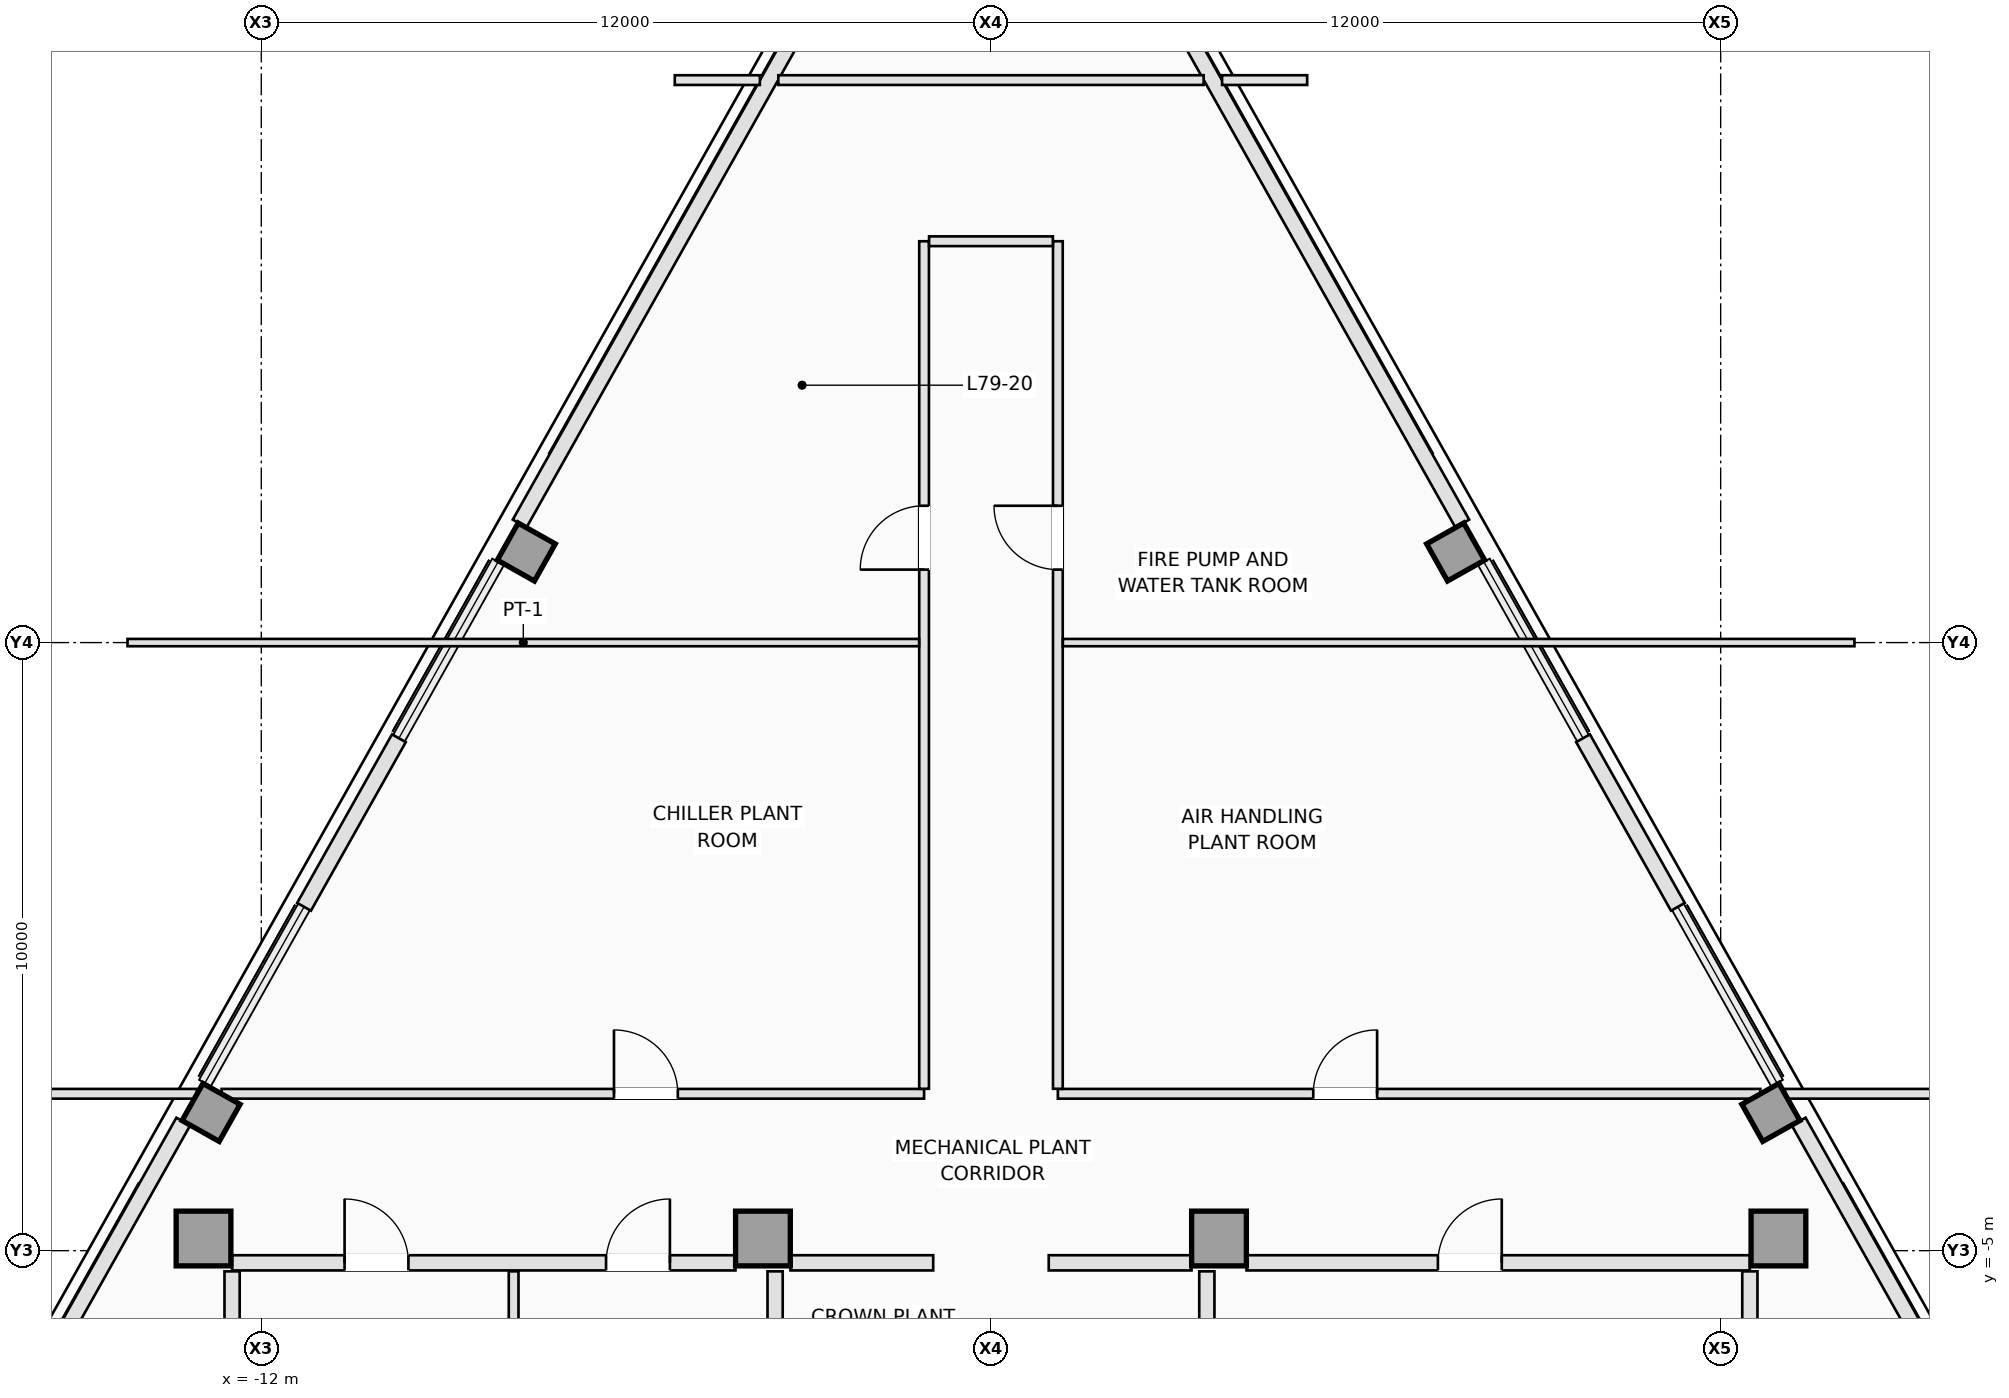
"""IFC4 building model, lengths in metres.
Left out: names, types, materials, properties, quantities, classifications, styles, units other than length and angle.
Written with IfcOpenShell. Run it as: python <this file> out.ifc"""

import sys

from ifc_helpers import new_model, si_unit, direction, frame, frame_2d, origin, origin_2d, place, context, subcontext, project, spatial, rectangle, extrude, element, fill, save


model = new_model("IFC4")
c1 = context("Model", 3, precision=1e-05, world=origin(), true_north=direction((0.0, 1.0)))
c2 = subcontext(c1, "Body", "Model", "MODEL_VIEW")
j1 = project(units=[si_unit("LENGTHUNIT", "METRE"), si_unit("PLANEANGLEUNIT", "RADIAN")], contexts=[c1])
p1 = place(None, origin())
s1 = spatial("IfcSite", under=j1, at=p1, CompositionType="ELEMENT")
p2 = place(p1, origin())
s2 = spatial("IfcBuilding", under=s1, at=p2, CompositionType="ELEMENT")
p3 = place(p2, frame((0.0, 0.0, 283.7)))
s3 = spatial("IfcBuildingStorey", under=s2, at=p3, CompositionType="ELEMENT", Elevation=283.7)
for number, where, z_axis, x_axis in (
    (1, (-12.95, -4.8, 0.0), (0.0, 0.0, 1.0), (1.0, 0.0, 0.0)),
    (2, (-3.75, -4.8, 0.0), (0.0, 0.0, 1.0), (1.0, 0.0, 0.0)),
    (3, (3.75, -4.8, 0.0), (0.0, 0.0, 1.0), (1.0, 0.0, 0.0)),
    (4, (12.95, -4.8, 0.0), (0.0, 0.0, 1.0), (1.0, 0.0, 0.0)),
):
    element("IfcColumn", number, at=place(p3, frame(where, z_axis=z_axis, x_axis=x_axis)), inside=s3, PredefinedType="COLUMN", context=c2, shape_type="SweptSolid", body=[
        extrude(rectangle(XDim=0.9, YDim=0.9, at=origin_2d()), origin(), (0.0, 0.0, 1.0), 3.2),
    ])
for number, where, z_axis, x_axis in (
    (5, (12.825, -2.727, 0.0), (0.0, 0.0, 1.0), (0.872, 0.49, 0.0)),
    (6, (7.642, 6.489, 0.0), (0.0, 0.0, 1.0), (0.872, 0.49, 0.0)),
    (7, (-7.642, 6.489, 0.0), (0.0, 0.0, 1.0), (-0.872, 0.49, 0.0)),
    (8, (-12.825, -2.727, 0.0), (0.0, 0.0, 1.0), (-0.872, 0.49, 0.0)),
):
    element("IfcColumn", number, at=place(p3, frame(where, z_axis=z_axis, x_axis=x_axis)), inside=s3, PredefinedType="COLUMN", context=c2, shape_type="SweptSolid", body=[
        extrude(rectangle(XDim=0.7, YDim=0.7, at=origin_2d()), origin(), (0.0, 0.0, 1.0), 3.2),
    ])
p4 = place(p3, frame((2.742, 15.863, 0.0), z_axis=(0.0, 0.0, 1.0), x_axis=(0.490260105081, -0.871576175309, 0.0)))
e9 = element("IfcWall", 9, at=p4, inside=s3, PredefinedType="STANDARD", context=c2, shape_type="SweptSolid", body=[
    extrude(rectangle(XDim=10.217, YDim=0.26, at=frame_2d((5.108, 0.0))), origin(), (0.0, 0.0, 1.0), 2.95),
])
p5 = place(p3, frame((13.283, -2.877, 0.0), z_axis=(0.0, 0.0, 1.0), x_axis=(0.490270316201, -0.871570431492, 0.0)))
e10 = element("IfcWall", 10, at=p5, inside=s3, PredefinedType="STANDARD", context=c2, shape_type="SweptSolid", body=[
    extrude(rectangle(XDim=10.216, YDim=0.26, at=frame_2d((5.108, 0.0))), origin(), (0.0, 0.0, 1.0), 2.95),
])
p6 = place(p3, frame((9.737, 3.427, 0.0), z_axis=(0.0, 0.0, 1.0), x_axis=(0.490283106586, -0.871563236602, 0.0)))
e11 = element("IfcWall", 11, at=p6, inside=s3, PredefinedType="STANDARD", context=c2, shape_type="SweptSolid", body=[
    extrude(rectangle(XDim=3.18, YDim=0.26, at=frame_2d((1.59, 0.0))), origin(), (0.0, 0.0, 1.0), 2.95),
])
p7 = place(p3, frame((-18.292, -11.781, 0.0), z_axis=(0.0, 0.0, 1.0), x_axis=(0.490270316201, 0.871570431492, 0.0)))
e12 = element("IfcWall", 12, at=p7, inside=s3, PredefinedType="STANDARD", context=c2, shape_type="SweptSolid", body=[
    extrude(rectangle(XDim=10.216, YDim=0.26, at=frame_2d((5.108, 0.0))), origin(), (0.0, 0.0, 1.0), 2.95),
])
p8 = place(p3, frame((-7.751, 6.958, 0.0), z_axis=(0.0, 0.0, 1.0), x_axis=(0.490260105081, 0.871576175309, 0.0)))
e13 = element("IfcWall", 13, at=p8, inside=s3, PredefinedType="STANDARD", context=c2, shape_type="SweptSolid", body=[
    extrude(rectangle(XDim=10.217, YDim=0.26, at=frame_2d((5.108, 0.0))), origin(), (0.0, 0.0, 1.0), 2.95),
])
p9 = place(p3, frame((-11.296, 0.655, 0.0), z_axis=(0.0, 0.0, 1.0), x_axis=(0.490283106586, 0.871563236602, 0.0)))
e14 = element("IfcWall", 14, at=p9, inside=s3, PredefinedType="STANDARD", context=c2, shape_type="SweptSolid", body=[
    extrude(rectangle(XDim=3.18, YDim=0.26, at=frame_2d((1.59, 0.0))), origin(), (0.0, 0.0, 1.0), 2.95),
])
for number, where, z_axis, x_axis in (
    (15, (-12.48, -10.18, 0.0), (0.0, 0.0, 1.0), (0.0, 1.0, 0.0)),
    (16, (12.48, -10.18, 0.0), (0.0, 0.0, 1.0), (0.0, 1.0, 0.0)),
):
    element("IfcWall", number, at=place(p3, frame(where, z_axis=z_axis, x_axis=x_axis)), inside=s3, PredefinedType="PARTITIONING", context=c2, shape_type="SweptSolid", body=[
        extrude(rectangle(XDim=4.84, YDim=0.25, at=frame_2d((2.42, 0.0))), origin(), (0.0, 0.0, 1.0), 2.95),
    ])
p10 = place(p3, frame((-3.55, -15.898, 0.0), z_axis=(0.0, 0.0, 1.0), x_axis=(0.0, 1.0, 0.0)))
e17 = element("IfcWall", 17, at=p10, inside=s3, PredefinedType="PARTITIONING", context=c2, shape_type="SweptSolid", body=[
    extrude(rectangle(XDim=10.558, YDim=0.25, at=frame_2d((5.279, 0.0))), origin(), (0.0, 0.0, 1.0), 2.95),
])
p11 = place(p10, frame((6.198, 0.0, 0.0)))
e18 = element("IfcOpeningElement", 18, at=p11, cuts=e17, PredefinedType="OPENING", context=c2, shape_type="SweptSolid", body=[
    extrude(rectangle(XDim=1.0, YDim=2.15, at=frame_2d((0.5, 1.075))), frame((0.0, 0.135, 0.0), z_axis=(0.0, -1.0, 0.0), x_axis=(1.0, 0.0, 0.0)), (0.0, 0.0, 1.0), 0.27),
])
p12 = place(p3, frame((3.55, -15.898, 0.0), z_axis=(0.0, 0.0, 1.0), x_axis=(0.0, 1.0, 0.0)))
e19 = element("IfcWall", 19, at=p12, inside=s3, PredefinedType="PARTITIONING", context=c2, shape_type="SweptSolid", body=[
    extrude(rectangle(XDim=10.558, YDim=0.25, at=frame_2d((5.279, 0.0))), origin(), (0.0, 0.0, 1.0), 2.95),
])
p13 = place(p12, frame((6.198, 0.0, 0.0)))
e20 = element("IfcOpeningElement", 20, at=p13, cuts=e19, PredefinedType="OPENING", context=c2, shape_type="SweptSolid", body=[
    extrude(rectangle(XDim=1.0, YDim=2.15, at=frame_2d((0.5, 1.075))), frame((0.0, 0.135, 0.0), z_axis=(0.0, -1.0, 0.0), x_axis=(1.0, 0.0, 0.0)), (0.0, 0.0, 1.0), 0.27),
])
p14 = place(p3, frame((-12.48, -5.2, 0.0), z_axis=(0.0, 0.0, 1.0), x_axis=(1.0, 0.0, 0.0)))
e21 = element("IfcWall", 21, at=p14, inside=s3, PredefinedType="PARTITIONING", context=c2, shape_type="SweptSolid", body=[
    extrude(rectangle(XDim=8.278, YDim=0.25, at=frame_2d((4.139, 0.0))), origin(), (0.0, 0.0, 1.0), 2.95),
])
p15 = place(p14, frame((1.85, 0.0, 0.0)))
e22 = element("IfcOpeningElement", 22, at=p15, cuts=e21, PredefinedType="OPENING", context=c2, shape_type="SweptSolid", body=[
    extrude(rectangle(XDim=1.05, YDim=2.12, at=frame_2d((0.525, 1.06))), frame((0.0, 0.135, 0.0), z_axis=(0.0, -1.0, 0.0), x_axis=(1.0, 0.0, 0.0)), (0.0, 0.0, 1.0), 0.27),
])
p16 = place(p14, frame((6.15, 0.0, 0.0)))
e23 = element("IfcOpeningElement", 23, at=p16, cuts=e21, PredefinedType="OPENING", context=c2, shape_type="SweptSolid", body=[
    extrude(rectangle(XDim=1.05, YDim=2.12, at=frame_2d((0.525, 1.06))), frame((0.0, 0.135, 0.0), z_axis=(0.0, -1.0, 0.0), x_axis=(1.0, 0.0, 0.0)), (0.0, 0.0, 1.0), 0.27),
])
p17 = place(p3, frame((4.202, -5.2, 0.0), z_axis=(0.0, 0.0, 1.0), x_axis=(1.0, 0.0, 0.0)))
e24 = element("IfcWall", 24, at=p17, inside=s3, PredefinedType="PARTITIONING", context=c2, shape_type="SweptSolid", body=[
    extrude(rectangle(XDim=8.278, YDim=0.25, at=frame_2d((4.139, 0.0))), origin(), (0.0, 0.0, 1.0), 2.95),
])
p18 = place(p17, frame((3.148, 0.0, 0.0)))
e25 = element("IfcOpeningElement", 25, at=p18, cuts=e24, PredefinedType="OPENING", context=c2, shape_type="SweptSolid", body=[
    extrude(rectangle(XDim=1.05, YDim=2.12, at=frame_2d((0.525, 1.06))), frame((0.0, 0.135, 0.0), z_axis=(0.0, -1.0, 0.0), x_axis=(1.0, 0.0, 0.0)), (0.0, 0.0, 1.0), 0.27),
])
for number, where, z_axis, x_axis in (
    (26, (-3.298, -5.2, 0.0), (0.0, 0.0, 1.0), (1.0, 0.0, 0.0)),
    (27, (0.95, -5.2, 0.0), (0.0, 0.0, 1.0), (1.0, 0.0, 0.0)),
):
    element("IfcWall", number, at=place(p3, frame(where, z_axis=z_axis, x_axis=x_axis)), inside=s3, PredefinedType="PARTITIONING", context=c2, shape_type="SweptSolid", body=[
        extrude(rectangle(XDim=2.348, YDim=0.25, at=frame_2d((1.174, 0.0))), origin(), (0.0, 0.0, 1.0), 2.95),
    ])
p19 = place(p3, frame((-7.85, -8.073, 0.0), z_axis=(0.0, 0.0, 1.0), x_axis=(0.0, 1.0, 0.0)))
e28 = element("IfcWall", 28, at=p19, inside=s3, PredefinedType="PARTITIONING", context=c2, shape_type="SweptSolid", body=[
    extrude(rectangle(XDim=2.733, YDim=0.16, at=frame_2d((1.366, 0.0))), origin(), (0.0, 0.0, 1.0), 2.95),
])
p20 = place(p3, frame((-5.2, 14.25, 0.0), z_axis=(0.0, 0.0, 1.0), x_axis=(1.0, 0.0, 0.0)))
e29 = element("IfcWall", 29, at=p20, inside=s3, PredefinedType="PARTITIONING", context=c2, shape_type="SweptSolid", body=[
    extrude(rectangle(XDim=1.4, YDim=0.16, at=frame_2d((0.7, 0.0))), origin(), (0.0, 0.0, 1.0), 2.95),
])
p21 = place(p3, frame((-3.498, 14.25, 0.0), z_axis=(0.0, 0.0, 1.0), x_axis=(1.0, 0.0, 0.0)))
e30 = element("IfcWall", 30, at=p21, inside=s3, PredefinedType="PARTITIONING", context=c2, shape_type="SweptSolid", body=[
    extrude(rectangle(XDim=6.995, YDim=0.16, at=frame_2d((3.498, 0.0))), origin(), (0.0, 0.0, 1.0), 2.95),
])
p22 = place(p3, frame((3.8, 14.25, 0.0), z_axis=(0.0, 0.0, 1.0), x_axis=(1.0, 0.0, 0.0)))
e31 = element("IfcWall", 31, at=p22, inside=s3, PredefinedType="PARTITIONING", context=c2, shape_type="SweptSolid", body=[
    extrude(rectangle(XDim=1.4, YDim=0.16, at=frame_2d((0.7, 0.0))), origin(), (0.0, 0.0, 1.0), 2.95),
])
p23 = place(p3, frame((-15.8, -2.42, 0.0), z_axis=(0.0, 0.0, 1.0), x_axis=(1.0, 0.0, 0.0)))
e32 = element("IfcWall", 32, at=p23, inside=s3, PredefinedType="PARTITIONING", context=c2, shape_type="SweptSolid", body=[
    extrude(rectangle(XDim=2.743, YDim=0.16, at=frame_2d((1.372, 0.0))), origin(), (0.0, 0.0, 1.0), 2.95),
])
p24 = place(p3, frame((-12.653, -2.42, 0.0), z_axis=(0.0, 0.0, 1.0), x_axis=(1.0, 0.0, 0.0)))
e33 = element("IfcWall", 33, at=p24, inside=s3, PredefinedType="PARTITIONING", context=c2, shape_type="SweptSolid", body=[
    extrude(rectangle(XDim=11.553, YDim=0.16, at=frame_2d((5.776, 0.0))), origin(), (0.0, 0.0, 1.0), 2.95),
])
p25 = place(p24, frame((6.453, 0.0, 0.0)))
e34 = element("IfcOpeningElement", 34, at=p25, cuts=e33, PredefinedType="OPENING", context=c2, shape_type="SweptSolid", body=[
    extrude(rectangle(XDim=1.05, YDim=2.12, at=frame_2d((0.525, 1.06))), frame((0.0, 0.09, 0.0), z_axis=(0.0, -1.0, 0.0), x_axis=(1.0, 0.0, 0.0)), (0.0, 0.0, 1.0), 0.18),
])
p26 = place(p3, frame((1.1, -2.42, 0.0), z_axis=(0.0, 0.0, 1.0), x_axis=(1.0, 0.0, 0.0)))
e35 = element("IfcWall", 35, at=p26, inside=s3, PredefinedType="PARTITIONING", context=c2, shape_type="SweptSolid", body=[
    extrude(rectangle(XDim=11.553, YDim=0.16, at=frame_2d((5.776, 0.0))), origin(), (0.0, 0.0, 1.0), 2.95),
])
p27 = place(p26, frame((4.2, 0.0, 0.0)))
e36 = element("IfcOpeningElement", 36, at=p27, cuts=e35, PredefinedType="OPENING", context=c2, shape_type="SweptSolid", body=[
    extrude(rectangle(XDim=1.05, YDim=2.12, at=frame_2d((0.525, 1.06))), frame((0.0, 0.09, 0.0), z_axis=(0.0, -1.0, 0.0), x_axis=(1.0, 0.0, 0.0)), (0.0, 0.0, 1.0), 0.18),
])
p28 = place(p3, frame((13.057, -2.42, 0.0), z_axis=(0.0, 0.0, 1.0), x_axis=(1.0, 0.0, 0.0)))
e37 = element("IfcWall", 37, at=p28, inside=s3, PredefinedType="PARTITIONING", context=c2, shape_type="SweptSolid", body=[
    extrude(rectangle(XDim=2.743, YDim=0.16, at=frame_2d((1.372, 0.0))), origin(), (0.0, 0.0, 1.0), 2.95),
])
p29 = place(p3, frame((-1.1, -2.338, 0.0), z_axis=(0.0, 0.0, 1.0), x_axis=(0.0, 1.0, 0.0)))
e38 = element("IfcWall", 38, at=p29, inside=s3, PredefinedType="PARTITIONING", context=c2, shape_type="SweptSolid", body=[
    extrude(rectangle(XDim=13.938, YDim=0.16, at=frame_2d((6.969, 0.0))), origin(), (0.0, 0.0, 1.0), 2.95),
])
p30 = place(p29, frame((8.538, 0.0, 0.0)))
e39 = element("IfcOpeningElement", 39, at=p30, cuts=e38, PredefinedType="OPENING", context=c2, shape_type="SweptSolid", body=[
    extrude(rectangle(XDim=1.05, YDim=2.12, at=frame_2d((0.525, 1.06))), frame((0.0, 0.09, 0.0), z_axis=(0.0, -1.0, 0.0), x_axis=(1.0, 0.0, 0.0)), (0.0, 0.0, 1.0), 0.18),
])
p31 = place(p3, frame((1.1, -2.338, 0.0), z_axis=(0.0, 0.0, 1.0), x_axis=(0.0, 1.0, 0.0)))
e40 = element("IfcWall", 40, at=p31, inside=s3, PredefinedType="PARTITIONING", context=c2, shape_type="SweptSolid", body=[
    extrude(rectangle(XDim=13.938, YDim=0.16, at=frame_2d((6.969, 0.0))), origin(), (0.0, 0.0, 1.0), 2.95),
])
p32 = place(p31, frame((8.538, 0.0, 0.0)))
e41 = element("IfcOpeningElement", 41, at=p32, cuts=e40, PredefinedType="OPENING", context=c2, shape_type="SweptSolid", body=[
    extrude(rectangle(XDim=1.05, YDim=2.12, at=frame_2d((0.525, 1.06))), frame((0.0, 0.09, 0.0), z_axis=(0.0, -1.0, 0.0), x_axis=(1.0, 0.0, 0.0)), (0.0, 0.0, 1.0), 0.18),
])
p33 = place(p3, frame((-1.018, 11.6, 0.0), z_axis=(0.0, 0.0, 1.0), x_axis=(1.0, 0.0, 0.0)))
e42 = element("IfcWall", 42, at=p33, inside=s3, PredefinedType="PARTITIONING", context=c2, shape_type="SweptSolid", body=[
    extrude(rectangle(XDim=2.036, YDim=0.16, at=frame_2d((1.018, 0.0))), origin(), (0.0, 0.0, 1.0), 2.95),
])
for number, where, z_axis, x_axis in (
    (43, (-14.2, 5.0, 0.0), (0.0, 0.0, 1.0), (1.0, 0.0, 0.0)),
    (44, (1.182, 5.0, 0.0), (0.0, 0.0, 1.0), (1.0, 0.0, 0.0)),
):
    element("IfcWall", number, at=place(p3, frame(where, z_axis=z_axis, x_axis=x_axis)), inside=s3, PredefinedType="PARTITIONING", context=c2, shape_type="SweptSolid", body=[
        extrude(rectangle(XDim=13.018, YDim=0.12, at=frame_2d((6.509, 0.0))), origin(), (0.0, 0.0, 1.0), 2.95),
    ])
p34 = place(p15, origin())
e45 = element("IfcDoor", 45, at=p34, inside=s3, OperationType="SINGLE_SWING_LEFT", PredefinedType="DOOR", context=c2, shape_type="SweptSolid", body=[
    extrude(rectangle(XDim=1.05, YDim=2.12, at=frame_2d((0.525, 1.06))), frame((0.0, 0.025, 0.0), z_axis=(0.0, -1.0, 0.0), x_axis=(1.0, 0.0, 0.0)), (0.0, 0.0, 1.0), 0.05),
])
fill(e22, e45)
p35 = place(p16, origin())
e46 = element("IfcDoor", 46, at=p35, inside=s3, OperationType="SINGLE_SWING_RIGHT", PredefinedType="DOOR", context=c2, shape_type="SweptSolid", body=[
    extrude(rectangle(XDim=1.05, YDim=2.12, at=frame_2d((0.525, 1.06))), frame((0.0, 0.025, 0.0), z_axis=(0.0, -1.0, 0.0), x_axis=(1.0, 0.0, 0.0)), (0.0, 0.0, 1.0), 0.05),
])
fill(e23, e46)
p36 = place(p18, origin())
e47 = element("IfcDoor", 47, at=p36, inside=s3, OperationType="SINGLE_SWING_RIGHT", PredefinedType="DOOR", context=c2, shape_type="SweptSolid", body=[
    extrude(rectangle(XDim=1.05, YDim=2.12, at=frame_2d((0.525, 1.06))), frame((0.0, 0.025, 0.0), z_axis=(0.0, -1.0, 0.0), x_axis=(1.0, 0.0, 0.0)), (0.0, 0.0, 1.0), 0.05),
])
fill(e25, e47)
p37 = place(p25, origin())
e48 = element("IfcDoor", 48, at=p37, inside=s3, OperationType="SINGLE_SWING_LEFT", PredefinedType="DOOR", context=c2, shape_type="SweptSolid", body=[
    extrude(rectangle(XDim=1.05, YDim=2.12, at=frame_2d((0.525, 1.06))), frame((0.0, 0.025, 0.0), z_axis=(0.0, -1.0, 0.0), x_axis=(1.0, 0.0, 0.0)), (0.0, 0.0, 1.0), 0.05),
])
fill(e34, e48)
p38 = place(p27, origin())
e49 = element("IfcDoor", 49, at=p38, inside=s3, OperationType="SINGLE_SWING_RIGHT", PredefinedType="DOOR", context=c2, shape_type="SweptSolid", body=[
    extrude(rectangle(XDim=1.05, YDim=2.12, at=frame_2d((0.525, 1.06))), frame((0.0, 0.025, 0.0), z_axis=(0.0, -1.0, 0.0), x_axis=(1.0, 0.0, 0.0)), (0.0, 0.0, 1.0), 0.05),
])
fill(e36, e49)
p39 = place(p30, origin())
e50 = element("IfcDoor", 50, at=p39, inside=s3, OperationType="SINGLE_SWING_LEFT", PredefinedType="DOOR", context=c2, shape_type="SweptSolid", body=[
    extrude(rectangle(XDim=1.05, YDim=2.12, at=frame_2d((0.525, 1.06))), frame((0.0, 0.025, 0.0), z_axis=(0.0, -1.0, 0.0), x_axis=(1.0, 0.0, 0.0)), (0.0, 0.0, 1.0), 0.05),
])
fill(e39, e50)
p40 = place(p32, origin())
e51 = element("IfcDoor", 51, at=p40, inside=s3, OperationType="SINGLE_SWING_RIGHT", PredefinedType="DOOR", context=c2, shape_type="SweptSolid", body=[
    extrude(rectangle(XDim=1.05, YDim=2.12, at=frame_2d((0.525, 1.06))), frame((0.0, 0.025, 0.0), z_axis=(0.0, -1.0, 0.0), x_axis=(1.0, 0.0, 0.0)), (0.0, 0.0, 1.0), 0.05),
])
fill(e41, e51)
save(model, sys.argv[1])
